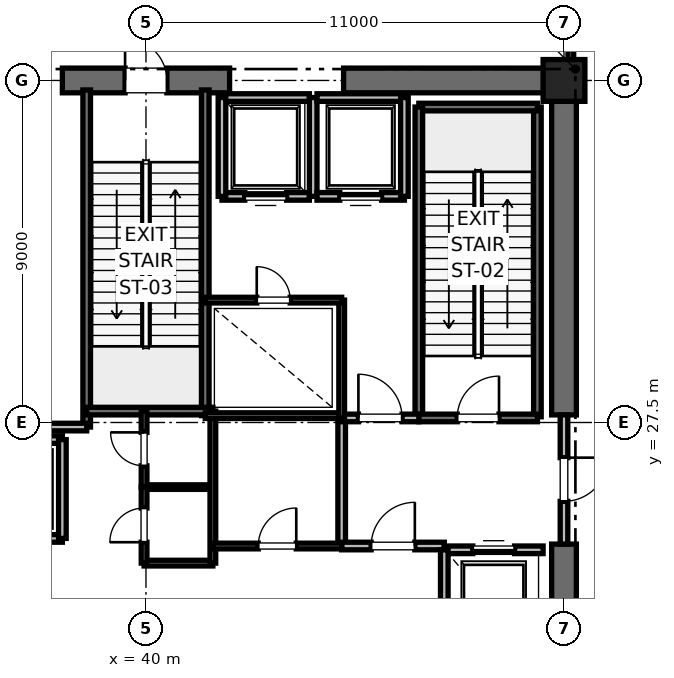
"""IFC4 building model, lengths in metres.
Left out: names, types, materials, properties, quantities, classifications, styles, units other than length and angle.
Written with IfcOpenShell. Run it as: python <this file> out.ifc"""

import sys

from ifc_helpers import new_model, si_unit, direction, frame, frame_2d, origin, origin_2d, place, context, subcontext, project, spatial, rectangle, extrude, element, fill, save


model = new_model("IFC4")
c1 = context("Model", 3, precision=1e-05, world=origin(), true_north=direction((0.0, 1.0)))
c2 = subcontext(c1, "Body", "Model", "MODEL_VIEW")
j1 = project(units=[si_unit("LENGTHUNIT", "METRE"), si_unit("PLANEANGLEUNIT", "RADIAN")], contexts=[c1])
p1 = place(None, origin())
s1 = spatial("IfcSite", under=j1, at=p1, CompositionType="ELEMENT")
p2 = place(p1, origin())
s2 = spatial("IfcBuilding", under=s1, at=p2, CompositionType="ELEMENT")
p3 = place(p2, origin())
s3 = spatial("IfcBuildingStorey", under=s2, at=p3, CompositionType="ELEMENT", Elevation=0.0)
p4 = place(p3, frame((51.0, 36.5, 0.0), z_axis=(0.0, 0.0, 1.0), x_axis=(1.0, 0.0, 0.0)))
e1 = element("IfcColumn", 1, at=p4, inside=s3, PredefinedType="PILASTER", context=c2, shape_type="SweptSolid", body=[
    extrude(rectangle(XDim=1.1, YDim=1.1, at=origin_2d()), origin(), (0.0, 0.0, 1.0), 6.0),
])
p5 = place(p3, frame((37.8, 36.5, 0.0), z_axis=(0.0, 0.0, 1.0), x_axis=(1.0, 0.0, 0.0)))
e2 = element("IfcWall", 2, at=p5, inside=s3, PredefinedType="SHEAR", context=c2, shape_type="SweptSolid", body=[
    extrude(rectangle(XDim=4.4, YDim=0.65, at=frame_2d((2.2, 0.0))), origin(), (0.0, 0.0, 1.0), 5.72),
])
p6 = place(p5, frame((1.65, 0.0, 0.0)))
e3 = element("IfcOpeningElement", 3, at=p6, cuts=e2, PredefinedType="OPENING", context=c2, shape_type="SweptSolid", body=[
    extrude(rectangle(XDim=1.1, YDim=2.15, at=frame_2d((0.55, 1.075))), frame((0.0, 0.325, 0.0), z_axis=(0.0, -1.0, 0.0), x_axis=(1.0, 0.0, 0.0)), (0.0, 0.0, 1.0), 0.65),
])
for number, where, z_axis, x_axis in (
    (4, (45.2, 36.5, 0.0), (0.0, 0.0, 1.0), (1.0, 0.0, 0.0)),
    (5, (51.0, 18.5, 0.0), (0.0, 0.0, 1.0), (0.0, 1.0, 0.0)),
):
    element("IfcWall", number, at=place(p3, frame(where, z_axis=z_axis, x_axis=x_axis)), inside=s3, PredefinedType="SHEAR", context=c2, shape_type="SweptSolid", body=[
        extrude(rectangle(XDim=5.8, YDim=0.65, at=frame_2d((2.9, 0.0))), origin(), (0.0, 0.0, 1.0), 5.72),
    ])
p7 = place(p3, frame((51.0, 27.7, 0.0), z_axis=(0.0, 0.0, 1.0), x_axis=(0.0, 1.0, 0.0)))
e6 = element("IfcWall", 6, at=p7, inside=s3, PredefinedType="SHEAR", context=c2, shape_type="SweptSolid", body=[
    extrude(rectangle(XDim=8.8, YDim=0.65, at=frame_2d((4.4, 0.0))), origin(), (0.0, 0.0, 1.0), 5.72),
])
p8 = place(p3, frame((50.3, 27.65, 0.0), z_axis=(0.0, 0.0, 1.0), x_axis=(0.0, 1.0, 0.0)))
e7 = element("IfcWall", 7, at=p8, inside=s3, PredefinedType="SOLIDWALL", context=c2, shape_type="SweptSolid", body=[
    extrude(rectangle(XDim=8.15, YDim=0.2, at=frame_2d((4.075, 0.0))), origin(), (0.0, 0.0, 1.0), 5.72),
])
p9 = place(p3, frame((47.18, 35.8, 0.0), z_axis=(0.0, 0.0, 1.0), x_axis=(1.0, 0.0, 0.0)))
e8 = element("IfcWall", 8, at=p9, inside=s3, PredefinedType="SOLIDWALL", context=c2, shape_type="SweptSolid", body=[
    extrude(rectangle(XDim=3.12, YDim=0.2, at=frame_2d((1.56, 0.0))), origin(), (0.0, 0.0, 1.0), 5.72),
])
p10 = place(p3, frame((47.18, 27.62, 0.0), z_axis=(0.0, 0.0, 1.0), x_axis=(0.0, 1.0, 0.0)))
e9 = element("IfcWall", 9, at=p10, inside=s3, PredefinedType="SOLIDWALL", context=c2, shape_type="SweptSolid", body=[
    extrude(rectangle(XDim=8.18, YDim=0.2, at=frame_2d((4.09, 0.0))), origin(), (0.0, 0.0, 1.0), 5.72),
])
p11 = place(p3, frame((47.18, 27.62, 0.0), z_axis=(0.0, 0.0, 1.0), x_axis=(1.0, 0.0, 0.0)))
e10 = element("IfcWall", 10, at=p11, inside=s3, PredefinedType="SOLIDWALL", context=c2, shape_type="SweptSolid", body=[
    extrude(rectangle(XDim=3.12, YDim=0.2, at=frame_2d((1.56, 0.0))), origin(), (0.0, 0.0, 1.0), 5.72),
])
p12 = place(p11, frame((1.01, 0.0, 0.0)))
e11 = element("IfcOpeningElement", 11, at=p12, cuts=e10, PredefinedType="OPENING", context=c2, shape_type="SweptSolid", body=[
    extrude(rectangle(XDim=1.1, YDim=2.15, at=frame_2d((0.55, 1.075))), frame((0.0, 0.1, 0.0), z_axis=(0.0, -1.0, 0.0), x_axis=(1.0, 0.0, 0.0)), (0.0, 0.0, 1.0), 0.2),
])
p13 = place(p3, frame((38.44, 27.38, 0.0), z_axis=(0.0, 0.0, 1.0), x_axis=(0.0, 1.0, 0.0)))
e12 = element("IfcWall", 12, at=p13, inside=s3, PredefinedType="SOLIDWALL", context=c2, shape_type="SweptSolid", body=[
    extrude(rectangle(XDim=8.87, YDim=0.2, at=frame_2d((4.435, 0.0))), origin(), (0.0, 0.0, 1.0), 5.72),
])
p14 = place(p3, frame((41.56, 27.68, 0.0), z_axis=(0.0, 0.0, 1.0), x_axis=(0.0, 1.0, 0.0)))
e13 = element("IfcWall", 13, at=p14, inside=s3, PredefinedType="SOLIDWALL", context=c2, shape_type="SweptSolid", body=[
    extrude(rectangle(XDim=8.57, YDim=0.2, at=frame_2d((4.285, 0.0))), origin(), (0.0, 0.0, 1.0), 5.72),
])
p15 = place(p3, frame((38.44, 27.8, 0.0), z_axis=(0.0, 0.0, 1.0), x_axis=(1.0, 0.0, 0.0)))
e14 = element("IfcWall", 14, at=p15, inside=s3, PredefinedType="SOLIDWALL", context=c2, shape_type="SweptSolid", body=[
    extrude(rectangle(XDim=3.32, YDim=0.2, at=frame_2d((1.66, 0.0))), origin(), (0.0, 0.0, 1.0), 5.72),
])
p16 = place(p3, frame((32.82, 27.38, 0.0), z_axis=(0.0, 0.0, 1.0), x_axis=(1.0, 0.0, 0.0)))
e15 = element("IfcWall", 15, at=p16, inside=s3, PredefinedType="PARTITIONING", context=c2, shape_type="SweptSolid", body=[
    extrude(rectangle(XDim=5.62, YDim=0.2, at=frame_2d((2.81, 0.0))), origin(), (0.0, 0.0, 1.0), 5.72),
])
p17 = place(p3, frame((45.15, 24.25, 0.0), z_axis=(0.0, 0.0, 1.0), x_axis=(0.0, 1.0, 0.0)))
e16 = element("IfcWall", 16, at=p17, inside=s3, PredefinedType="PARTITIONING", context=c2, shape_type="SweptSolid", body=[
    extrude(rectangle(XDim=3.37, YDim=0.2, at=frame_2d((1.685, 0.0))), origin(), (0.0, 0.0, 1.0), 5.72),
])
p18 = place(p3, frame((45.15, 24.25, 0.0), z_axis=(0.0, 0.0, 1.0), x_axis=(1.0, 0.0, 0.0)))
e17 = element("IfcWall", 17, at=p18, inside=s3, PredefinedType="PARTITIONING", context=c2, shape_type="SweptSolid", body=[
    extrude(rectangle(XDim=2.7, YDim=0.2, at=frame_2d((1.35, 0.0))), origin(), (0.0, 0.0, 1.0), 5.72),
])
p19 = place(p18, frame((0.775, 0.0, 0.0)))
e18 = element("IfcOpeningElement", 18, at=p19, cuts=e17, PredefinedType="OPENING", context=c2, shape_type="SweptSolid", body=[
    extrude(rectangle(XDim=1.15, YDim=2.2, at=frame_2d((0.575, 1.1))), frame((0.0, 0.1, 0.0), z_axis=(0.0, -1.0, 0.0), x_axis=(1.0, 0.0, 0.0)), (0.0, 0.0, 1.0), 0.2),
])
p20 = place(p3, frame((45.15, 27.62, 0.0), z_axis=(0.0, 0.0, 1.0), x_axis=(1.0, 0.0, 0.0)))
e19 = element("IfcWall", 19, at=p20, inside=s3, PredefinedType="PARTITIONING", context=c2, shape_type="SweptSolid", body=[
    extrude(rectangle(XDim=2.03, YDim=0.2, at=frame_2d((1.015, 0.0))), origin(), (0.0, 0.0, 1.0), 5.72),
])
p21 = place(p20, frame((0.44, 0.0, 0.0)))
e20 = element("IfcOpeningElement", 20, at=p21, cuts=e19, PredefinedType="OPENING", context=c2, shape_type="SweptSolid", body=[
    extrude(rectangle(XDim=1.15, YDim=2.2, at=frame_2d((0.575, 1.1))), frame((0.0, 0.1, 0.0), z_axis=(0.0, -1.0, 0.0), x_axis=(1.0, 0.0, 0.0)), (0.0, 0.0, 1.0), 0.2),
])
p22 = place(p3, frame((51.0, 27.7, 0.0), z_axis=(0.0, 0.0, 1.0), x_axis=(0.0, -1.0, 0.0)))
e21 = element("IfcWall", 21, at=p22, inside=s3, PredefinedType="PARTITIONING", context=c2, shape_type="SweptSolid", body=[
    extrude(rectangle(XDim=3.4, YDim=0.2, at=frame_2d((1.7, 0.0))), origin(), (0.0, 0.0, 1.0), 4.5),
])
p23 = place(p22, frame((1.125, 0.0, 0.0)))
e22 = element("IfcOpeningElement", 22, at=p23, cuts=e21, PredefinedType="OPENING", context=c2, shape_type="SweptSolid", body=[
    extrude(rectangle(XDim=1.15, YDim=2.2, at=frame_2d((0.575, 1.1))), frame((0.0, 0.1, 0.0), z_axis=(0.0, -1.0, 0.0), x_axis=(1.0, 0.0, 0.0)), (0.0, 0.0, 1.0), 0.2),
])
p24 = place(p3, frame((50.45, 24.15, 0.0), z_axis=(0.0, 0.0, 1.0), x_axis=(-1.0, 0.0, 0.0)))
e23 = element("IfcWall", 23, at=p24, inside=s3, PredefinedType="SOLIDWALL", context=c2, shape_type="SweptSolid", body=[
    extrude(rectangle(XDim=2.6, YDim=0.2, at=frame_2d((1.3, 0.0))), origin(), (0.0, 0.0, 1.0), 4.5),
])
p25 = place(p24, frame((0.75, 0.0, 0.0)))
e24 = element("IfcOpeningElement", 24, at=p25, cuts=e23, PredefinedType="OPENING", context=c2, shape_type="SweptSolid", body=[
    extrude(rectangle(XDim=1.1, YDim=2.2, at=frame_2d((0.55, 1.1))), frame((0.0, 0.1, 0.0), z_axis=(0.0, -1.0, 0.0), x_axis=(1.0, 0.0, 0.0)), (0.0, 0.0, 1.0), 0.2),
])
p26 = place(p3, frame((47.85, 24.15, 0.0), z_axis=(0.0, 0.0, 1.0), x_axis=(0.0, -1.0, 0.0)))
e25 = element("IfcWall", 25, at=p26, inside=s3, PredefinedType="SOLIDWALL", context=c2, shape_type="SweptSolid", body=[
    extrude(rectangle(XDim=3.0, YDim=0.2, at=frame_2d((1.5, 0.0))), origin(), (0.0, 0.0, 1.0), 5.72),
])
p27 = place(p3, frame((35.5, 24.45, 0.0), z_axis=(0.0, 0.0, 1.0), x_axis=(1.0, 0.0, 0.0)))
e26 = element("IfcWall", 26, at=p27, inside=s3, PredefinedType="SOLIDWALL", context=c2, shape_type="SweptSolid", body=[
    extrude(rectangle(XDim=2.3, YDim=0.2, at=frame_2d((1.15, 0.0))), origin(), (0.0, 0.0, 1.0), 5.72),
])
p28 = place(p27, frame((0.6, 0.0, 0.0)))
e27 = element("IfcOpeningElement", 27, at=p28, cuts=e26, PredefinedType="OPENING", context=c2, shape_type="SweptSolid", body=[
    extrude(rectangle(XDim=1.1, YDim=2.2, at=frame_2d((0.55, 1.1))), frame((0.0, 0.1, 0.0), z_axis=(0.0, -1.0, 0.0), x_axis=(1.0, 0.0, 0.0)), (0.0, 0.0, 1.0), 0.2),
])
p29 = place(p3, frame((37.8, 27.05, 0.0), z_axis=(0.0, 0.0, 1.0), x_axis=(-1.0, 0.0, 0.0)))
e28 = element("IfcWall", 28, at=p29, inside=s3, PredefinedType="SOLIDWALL", context=c2, shape_type="SweptSolid", body=[
    extrude(rectangle(XDim=2.3, YDim=0.2, at=frame_2d((1.15, 0.0))), origin(), (0.0, 0.0, 1.0), 5.72),
])
p30 = place(p3, frame((37.8, 24.45, 0.0), z_axis=(0.0, 0.0, 1.0), x_axis=(0.0, 1.0, 0.0)))
e29 = element("IfcWall", 29, at=p30, inside=s3, PredefinedType="SOLIDWALL", context=c2, shape_type="SweptSolid", body=[
    extrude(rectangle(XDim=2.6, YDim=0.2, at=frame_2d((1.3, 0.0))), origin(), (0.0, 0.0, 1.0), 5.72),
])
p31 = place(p3, frame((42.0, 33.45, 0.0), z_axis=(0.0, 0.0, 1.0), x_axis=(1.0, 0.0, 0.0)))
e30 = element("IfcWall", 30, at=p31, inside=s3, PredefinedType="SOLIDWALL", context=c2, shape_type="SweptSolid", body=[
    extrude(rectangle(XDim=2.3, YDim=0.2, at=frame_2d((1.15, 0.0))), origin(), (0.0, 0.0, 1.0), 5.72),
])
p32 = place(p31, frame((0.6, 0.0, 0.0)))
e31 = element("IfcOpeningElement", 31, at=p32, cuts=e30, PredefinedType="OPENING", context=c2, shape_type="SweptSolid", body=[
    extrude(rectangle(XDim=1.1, YDim=2.2, at=frame_2d((0.55, 1.1))), frame((0.0, 0.1, 0.0), z_axis=(0.0, -1.0, 0.0), x_axis=(1.0, 0.0, 0.0)), (0.0, 0.0, 1.0), 0.2),
])
p33 = place(p3, frame((44.3, 36.05, 0.0), z_axis=(0.0, 0.0, 1.0), x_axis=(-1.0, 0.0, 0.0)))
e32 = element("IfcWall", 32, at=p33, inside=s3, PredefinedType="SOLIDWALL", context=c2, shape_type="SweptSolid", body=[
    extrude(rectangle(XDim=2.3, YDim=0.2, at=frame_2d((1.15, 0.0))), origin(), (0.0, 0.0, 1.0), 4.5),
])
for number, where, z_axis, x_axis in (
    (33, (42.0, 36.05, 0.0), (0.0, 0.0, 1.0), (0.0, -1.0, 0.0)),
    (34, (44.4, 33.45, 0.0), (0.0, 0.0, 1.0), (0.0, 1.0, 0.0)),
):
    element("IfcWall", number, at=place(p3, frame(where, z_axis=z_axis, x_axis=x_axis)), inside=s3, PredefinedType="SOLIDWALL", context=c2, shape_type="SweptSolid", body=[
        extrude(rectangle(XDim=2.6, YDim=0.2, at=frame_2d((1.3, 0.0))), origin(), (0.0, 0.0, 1.0), 4.5),
    ])
p34 = place(p3, frame((44.5, 33.45, 0.0), z_axis=(0.0, 0.0, 1.0), x_axis=(1.0, 0.0, 0.0)))
e35 = element("IfcWall", 35, at=p34, inside=s3, PredefinedType="SOLIDWALL", context=c2, shape_type="SweptSolid", body=[
    extrude(rectangle(XDim=2.3, YDim=0.2, at=frame_2d((1.15, 0.0))), origin(), (0.0, 0.0, 1.0), 5.72),
])
p35 = place(p34, frame((0.6, 0.0, 0.0)))
e36 = element("IfcOpeningElement", 36, at=p35, cuts=e35, PredefinedType="OPENING", context=c2, shape_type="SweptSolid", body=[
    extrude(rectangle(XDim=1.1, YDim=2.2, at=frame_2d((0.55, 1.1))), frame((0.0, 0.1, 0.0), z_axis=(0.0, -1.0, 0.0), x_axis=(1.0, 0.0, 0.0)), (0.0, 0.0, 1.0), 0.2),
])
p36 = place(p3, frame((46.8, 36.05, 0.0), z_axis=(0.0, 0.0, 1.0), x_axis=(-1.0, 0.0, 0.0)))
e37 = element("IfcWall", 37, at=p36, inside=s3, PredefinedType="SOLIDWALL", context=c2, shape_type="SweptSolid", body=[
    extrude(rectangle(XDim=2.3, YDim=0.2, at=frame_2d((1.15, 0.0))), origin(), (0.0, 0.0, 1.0), 4.5),
])
p37 = place(p3, frame((46.8, 33.45, 0.0), z_axis=(0.0, 0.0, 1.0), x_axis=(0.0, 1.0, 0.0)))
e38 = element("IfcWall", 38, at=p37, inside=s3, PredefinedType="SOLIDWALL", context=c2, shape_type="SweptSolid", body=[
    extrude(rectangle(XDim=2.6, YDim=0.2, at=frame_2d((1.3, 0.0))), origin(), (0.0, 0.0, 1.0), 5.72),
])
p38 = place(p3, frame((39.95, 23.8, 0.0), z_axis=(0.0, 0.0, 1.0), x_axis=(1.0, 0.0, 0.0)))
e39 = element("IfcWall", 39, at=p38, inside=s3, PredefinedType="PARTITIONING", context=c2, shape_type="SweptSolid", body=[
    extrude(rectangle(XDim=1.81, YDim=0.15, at=frame_2d((0.905, 0.0))), origin(), (0.0, 0.0, 1.0), 2.85),
])
p39 = place(p3, frame((39.95, 25.8, 0.0), z_axis=(0.0, 0.0, 1.0), x_axis=(1.0, 0.0, 0.0)))
e40 = element("IfcWall", 40, at=p39, inside=s3, PredefinedType="PARTITIONING", context=c2, shape_type="SweptSolid", body=[
    extrude(rectangle(XDim=1.81, YDim=0.12, at=frame_2d((0.905, 0.0))), origin(), (0.0, 0.0, 1.0), 2.85),
])
p40 = place(p3, frame((41.76, 23.8, 0.0), z_axis=(0.0, 0.0, 1.0), x_axis=(0.0, 1.0, 0.0)))
e41 = element("IfcWall", 41, at=p40, inside=s3, PredefinedType="PARTITIONING", context=c2, shape_type="SweptSolid", body=[
    extrude(rectangle(XDim=4.0, YDim=0.15, at=frame_2d((2.0, 0.0))), origin(), (0.0, 0.0, 1.0), 2.85),
])
p41 = place(p3, frame((39.95, 23.8, 0.0), z_axis=(0.0, 0.0, 1.0), x_axis=(0.0, 1.0, 0.0)))
e42 = element("IfcWall", 42, at=p41, inside=s3, PredefinedType="PARTITIONING", context=c2, shape_type="SweptSolid", body=[
    extrude(rectangle(XDim=2.0, YDim=0.15, at=frame_2d((1.0, 0.0))), origin(), (0.0, 0.0, 1.0), 2.85),
])
p42 = place(p41, frame((0.55, 0.0, 0.0)))
e43 = element("IfcOpeningElement", 43, at=p42, cuts=e42, PredefinedType="OPENING", context=c2, shape_type="SweptSolid", body=[
    extrude(rectangle(XDim=0.9, YDim=2.1, at=frame_2d((0.45, 1.05))), frame((0.0, 0.075, 0.0), z_axis=(0.0, -1.0, 0.0), x_axis=(1.0, 0.0, 0.0)), (0.0, 0.0, 1.0), 0.15),
])
p43 = place(p3, frame((39.95, 25.8, 0.0), z_axis=(0.0, 0.0, 1.0), x_axis=(0.0, 1.0, 0.0)))
e44 = element("IfcWall", 44, at=p43, inside=s3, PredefinedType="PARTITIONING", context=c2, shape_type="SweptSolid", body=[
    extrude(rectangle(XDim=2.0, YDim=0.15, at=frame_2d((1.0, 0.0))), origin(), (0.0, 0.0, 1.0), 2.85),
])
p44 = place(p43, frame((0.56, 0.0, 0.0)))
e45 = element("IfcOpeningElement", 45, at=p44, cuts=e44, PredefinedType="OPENING", context=c2, shape_type="SweptSolid", body=[
    extrude(rectangle(XDim=0.88, YDim=2.1, at=frame_2d((0.44, 1.05))), frame((0.0, 0.075, 0.0), z_axis=(0.0, -1.0, 0.0), x_axis=(1.0, 0.0, 0.0)), (0.0, 0.0, 1.0), 0.15),
])
p45 = place(p3, frame((41.56, 27.68, 0.0), z_axis=(0.0, 0.0, 1.0), x_axis=(1.0, 0.0, 0.0)))
e46 = element("IfcWall", 46, at=p45, inside=s3, PredefinedType="PARTITIONING", context=c2, shape_type="SweptSolid", body=[
    extrude(rectangle(XDim=3.59, YDim=0.15, at=frame_2d((1.795, 0.0))), origin(), (0.0, 0.0, 1.0), 2.85),
])
p46 = place(p3, frame((41.76, 24.25, 0.0), z_axis=(0.0, 0.0, 1.0), x_axis=(1.0, 0.0, 0.0)))
e47 = element("IfcWall", 47, at=p46, inside=s3, PredefinedType="PARTITIONING", context=c2, shape_type="SweptSolid", body=[
    extrude(rectangle(XDim=3.39, YDim=0.15, at=frame_2d((1.695, 0.0))), origin(), (0.0, 0.0, 1.0), 2.85),
])
p47 = place(p46, frame((1.195, 0.0, 0.0)))
e48 = element("IfcOpeningElement", 48, at=p47, cuts=e47, PredefinedType="OPENING", context=c2, shape_type="SweptSolid", body=[
    extrude(rectangle(XDim=1.0, YDim=2.15, at=frame_2d((0.5, 1.075))), frame((0.0, 0.075, 0.0), z_axis=(0.0, -1.0, 0.0), x_axis=(1.0, 0.0, 0.0)), (0.0, 0.0, 1.0), 0.15),
])
p48 = place(p3, frame((45.15, 27.62, 0.0), z_axis=(0.0, 0.0, 1.0), x_axis=(0.0, 1.0, 0.0)))
e49 = element("IfcWall", 49, at=p48, inside=s3, PredefinedType="PARTITIONING", context=c2, shape_type="SweptSolid", body=[
    extrude(rectangle(XDim=3.1, YDim=0.15, at=frame_2d((1.55, 0.0))), origin(), (0.0, 0.0, 1.0), 2.85),
])
p49 = place(p3, frame((41.56, 30.72, 0.0), z_axis=(0.0, 0.0, 1.0), x_axis=(1.0, 0.0, 0.0)))
e50 = element("IfcWall", 50, at=p49, inside=s3, PredefinedType="PARTITIONING", context=c2, shape_type="SweptSolid", body=[
    extrude(rectangle(XDim=3.59, YDim=0.15, at=frame_2d((1.795, 0.0))), origin(), (0.0, 0.0, 1.0), 2.85),
])
p50 = place(p49, frame((1.355, 0.0, 0.0)))
e51 = element("IfcOpeningElement", 51, at=p50, cuts=e50, PredefinedType="OPENING", context=c2, shape_type="SweptSolid", body=[
    extrude(rectangle(XDim=0.88, YDim=2.1, at=frame_2d((0.44, 1.05))), frame((0.0, 0.075, 0.0), z_axis=(0.0, -1.0, 0.0), x_axis=(1.0, 0.0, 0.0)), (0.0, 0.0, 1.0), 0.15),
])
p51 = place(p3, frame((51.18, 39.35, 0.0), z_axis=(0.0, 0.0, 1.0), x_axis=(0.0, -1.0, 0.0)))
e52 = element("IfcWall", 52, at=p51, inside=s3, PredefinedType="PARTITIONING", context=c2, shape_type="SweptSolid", body=[
    extrude(rectangle(XDim=2.75, YDim=0.15, at=frame_2d((1.375, 0.0))), origin(), (0.0, 0.0, 1.0), 2.85),
])
p52 = place(p51, frame((0.8, 0.0, 0.0)))
e53 = element("IfcOpeningElement", 53, at=p52, cuts=e52, PredefinedType="OPENING", context=c2, shape_type="SweptSolid", body=[
    extrude(rectangle(XDim=1.15, YDim=2.2, at=frame_2d((0.575, 1.1))), frame((0.0, 0.075, 0.0), z_axis=(0.0, -1.0, 0.0), x_axis=(1.0, 0.0, 0.0)), (0.0, 0.0, 1.0), 0.15),
])
p53 = place(p12, origin())
e54 = element("IfcDoor", 54, at=p53, inside=s3, OperationType="SINGLE_SWING_RIGHT", PredefinedType="DOOR", context=c2, shape_type="SweptSolid", body=[
    extrude(rectangle(XDim=1.1, YDim=2.15, at=frame_2d((0.55, 1.075))), frame((0.0, 0.025, 0.0), z_axis=(0.0, -1.0, 0.0), x_axis=(1.0, 0.0, 0.0)), (0.0, 0.0, 1.0), 0.05),
])
fill(e11, e54)
p54 = place(p6, origin())
e55 = element("IfcDoor", 55, at=p54, inside=s3, OperationType="SINGLE_SWING_LEFT", PredefinedType="DOOR", context=c2, shape_type="SweptSolid", body=[
    extrude(rectangle(XDim=1.1, YDim=2.15, at=frame_2d((0.55, 1.075))), frame((0.0, 0.025, 0.0), z_axis=(0.0, -1.0, 0.0), x_axis=(1.0, 0.0, 0.0)), (0.0, 0.0, 1.0), 0.05),
])
fill(e3, e55)
p55 = place(p19, origin())
e56 = element("IfcDoor", 56, at=p55, inside=s3, OperationType="SINGLE_SWING_RIGHT", PredefinedType="DOOR", context=c2, shape_type="SweptSolid", body=[
    extrude(rectangle(XDim=1.15, YDim=2.2, at=frame_2d((0.575, 1.1))), frame((0.0, 0.025, 0.0), z_axis=(0.0, -1.0, 0.0), x_axis=(1.0, 0.0, 0.0)), (0.0, 0.0, 1.0), 0.05),
])
fill(e18, e56)
p56 = place(p21, origin())
e57 = element("IfcDoor", 57, at=p56, inside=s3, OperationType="SINGLE_SWING_LEFT", PredefinedType="DOOR", context=c2, shape_type="SweptSolid", body=[
    extrude(rectangle(XDim=1.15, YDim=2.2, at=frame_2d((0.575, 1.1))), frame((0.0, 0.025, 0.0), z_axis=(0.0, -1.0, 0.0), x_axis=(1.0, 0.0, 0.0)), (0.0, 0.0, 1.0), 0.05),
])
fill(e20, e57)
p57 = place(p23, origin())
e58 = element("IfcDoor", 58, at=p57, inside=s3, OperationType="SINGLE_SWING_LEFT", PredefinedType="DOOR", context=c2, shape_type="SweptSolid", body=[
    extrude(rectangle(XDim=1.15, YDim=2.2, at=frame_2d((0.575, 1.1))), frame((0.0, 0.025, 0.0), z_axis=(0.0, -1.0, 0.0), x_axis=(1.0, 0.0, 0.0)), (0.0, 0.0, 1.0), 0.05),
])
fill(e22, e58)
p58 = place(p25, origin())
e59 = element("IfcDoor", 59, at=p58, inside=s3, OperationType="SLIDING_TO_RIGHT", PredefinedType="DOOR", context=c2, shape_type="SweptSolid", body=[
    extrude(rectangle(XDim=1.1, YDim=2.2, at=frame_2d((0.55, 1.1))), frame((0.0, 0.025, 0.0), z_axis=(0.0, -1.0, 0.0), x_axis=(1.0, 0.0, 0.0)), (0.0, 0.0, 1.0), 0.05),
])
fill(e24, e59)
p59 = place(p32, origin())
e60 = element("IfcDoor", 60, at=p59, inside=s3, OperationType="SLIDING_TO_RIGHT", PredefinedType="DOOR", context=c2, shape_type="SweptSolid", body=[
    extrude(rectangle(XDim=1.1, YDim=2.2, at=frame_2d((0.55, 1.1))), frame((0.0, 0.025, 0.0), z_axis=(0.0, -1.0, 0.0), x_axis=(1.0, 0.0, 0.0)), (0.0, 0.0, 1.0), 0.05),
])
fill(e31, e60)
p60 = place(p35, origin())
e61 = element("IfcDoor", 61, at=p60, inside=s3, OperationType="SLIDING_TO_RIGHT", PredefinedType="DOOR", context=c2, shape_type="SweptSolid", body=[
    extrude(rectangle(XDim=1.1, YDim=2.2, at=frame_2d((0.55, 1.1))), frame((0.0, 0.025, 0.0), z_axis=(0.0, -1.0, 0.0), x_axis=(1.0, 0.0, 0.0)), (0.0, 0.0, 1.0), 0.05),
])
fill(e36, e61)
p61 = place(p42, origin())
e62 = element("IfcDoor", 62, at=p61, inside=s3, OperationType="SINGLE_SWING_LEFT", PredefinedType="DOOR", context=c2, shape_type="SweptSolid", body=[
    extrude(rectangle(XDim=0.9, YDim=2.1, at=frame_2d((0.45, 1.05))), frame((0.0, 0.025, 0.0), z_axis=(0.0, -1.0, 0.0), x_axis=(1.0, 0.0, 0.0)), (0.0, 0.0, 1.0), 0.05),
])
fill(e43, e62)
p62 = place(p44, origin())
e63 = element("IfcDoor", 63, at=p62, inside=s3, OperationType="SINGLE_SWING_RIGHT", PredefinedType="DOOR", context=c2, shape_type="SweptSolid", body=[
    extrude(rectangle(XDim=0.88, YDim=2.1, at=frame_2d((0.44, 1.05))), frame((0.0, 0.025, 0.0), z_axis=(0.0, -1.0, 0.0), x_axis=(1.0, 0.0, 0.0)), (0.0, 0.0, 1.0), 0.05),
])
fill(e45, e63)
p63 = place(p47, origin())
e64 = element("IfcDoor", 64, at=p63, inside=s3, OperationType="SINGLE_SWING_RIGHT", PredefinedType="DOOR", context=c2, shape_type="SweptSolid", body=[
    extrude(rectangle(XDim=1.0, YDim=2.15, at=frame_2d((0.5, 1.075))), frame((0.0, 0.025, 0.0), z_axis=(0.0, -1.0, 0.0), x_axis=(1.0, 0.0, 0.0)), (0.0, 0.0, 1.0), 0.05),
])
fill(e48, e64)
p64 = place(p50, origin())
e65 = element("IfcDoor", 65, at=p64, inside=s3, OperationType="SINGLE_SWING_LEFT", PredefinedType="DOOR", context=c2, shape_type="SweptSolid", body=[
    extrude(rectangle(XDim=0.88, YDim=2.1, at=frame_2d((0.44, 1.05))), frame((0.0, 0.025, 0.0), z_axis=(0.0, -1.0, 0.0), x_axis=(1.0, 0.0, 0.0)), (0.0, 0.0, 1.0), 0.05),
])
fill(e51, e65)
save(model, sys.argv[1])
